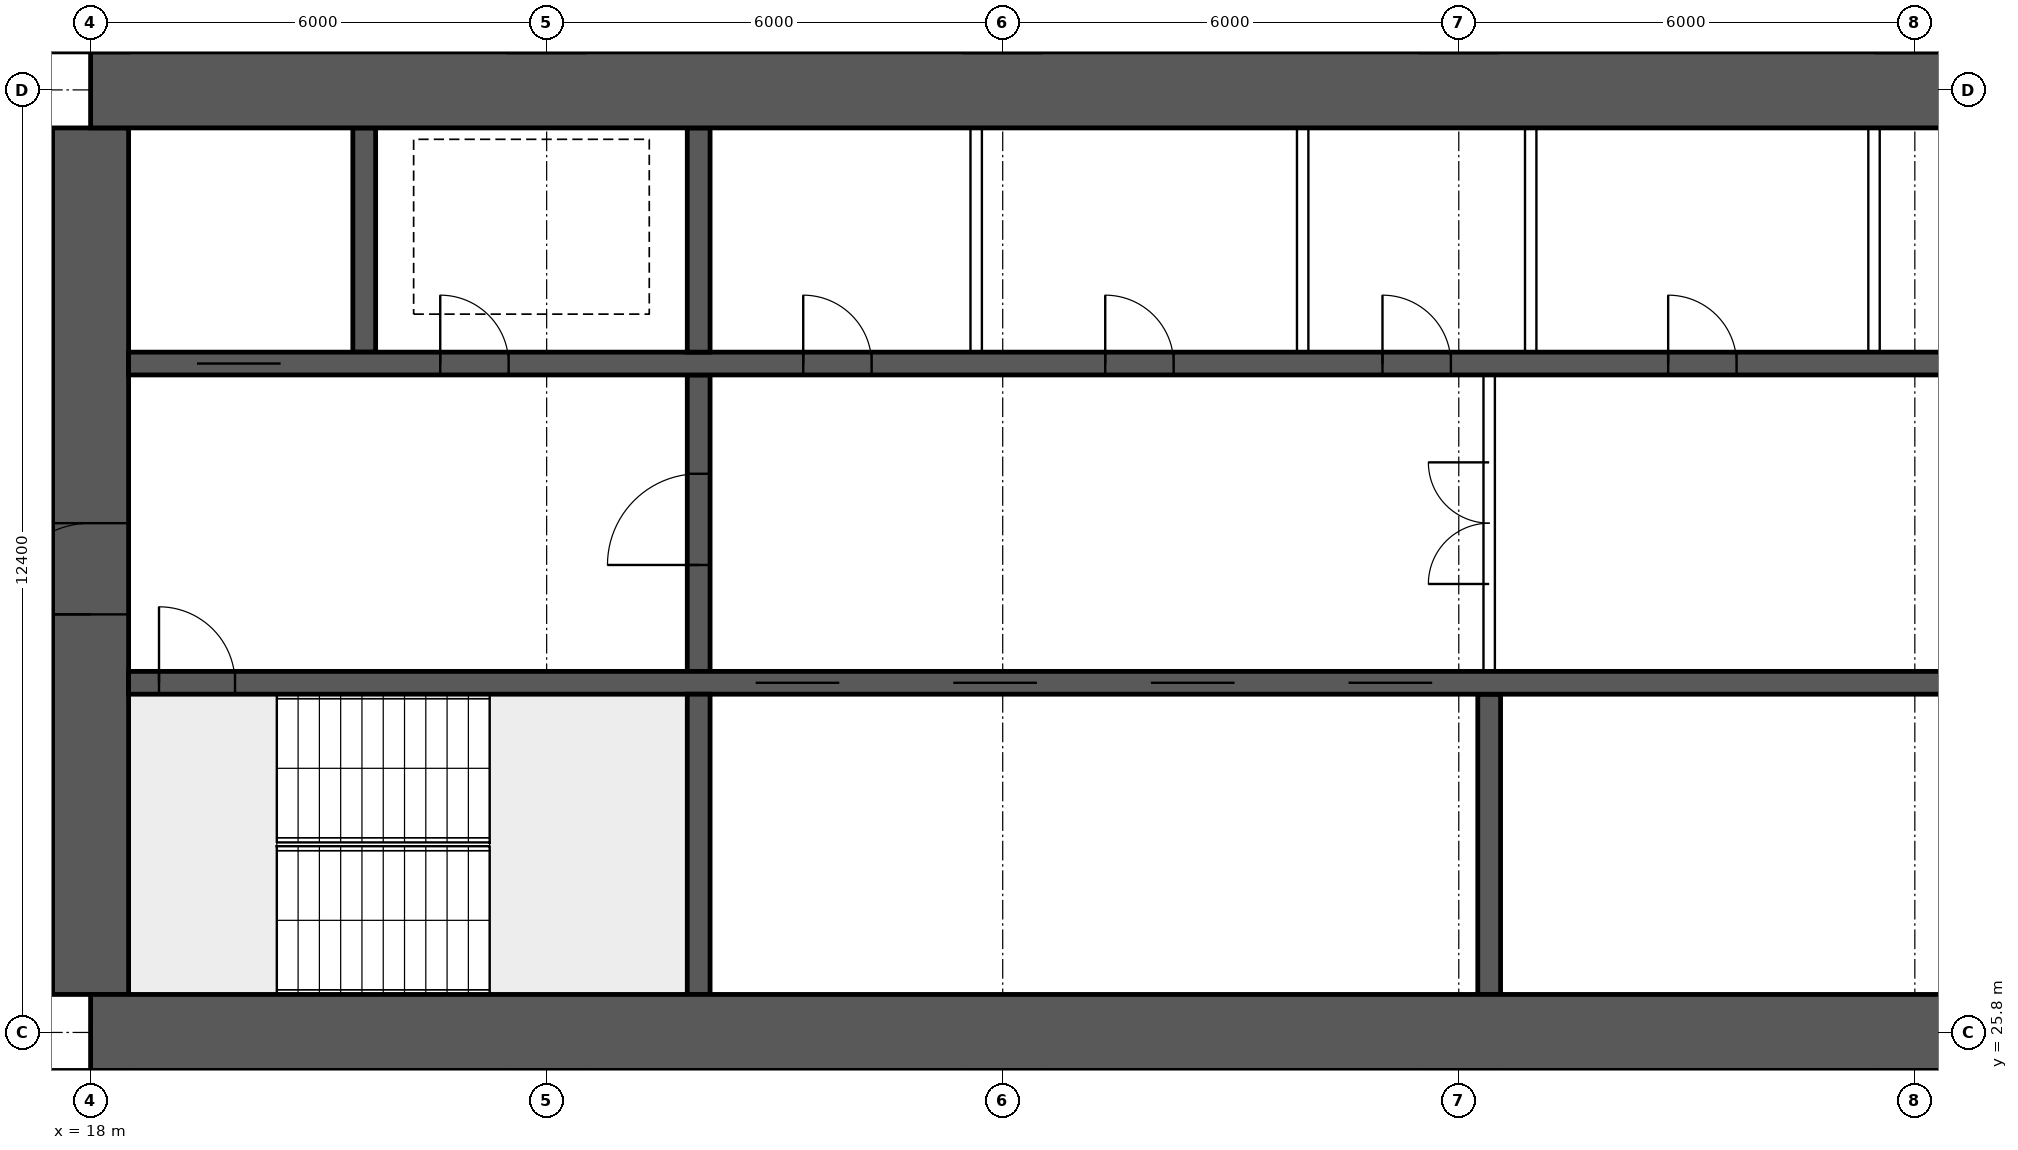
"""IFC4 building model, lengths in metres.
Left out: names, types, materials, properties, quantities, classifications, styles, units other than length and angle.
Written with IfcOpenShell. Run it as: python <this file> out.ifc"""

import sys

from ifc_helpers import new_model, si_unit, direction, frame, frame_2d, origin, place, context, subcontext, project, spatial, rectangle, extrude, element, fill, save


model = new_model("IFC4")
c1 = context("Model", 3, precision=1e-05, world=origin(), true_north=direction((0.0, 1.0)))
c2 = subcontext(c1, "Body", "Model", "MODEL_VIEW")
j1 = project(units=[si_unit("LENGTHUNIT", "METRE"), si_unit("PLANEANGLEUNIT", "RADIAN")], contexts=[c1])
p1 = place(None, origin())
s1 = spatial("IfcSite", under=j1, at=p1, CompositionType="ELEMENT")
p2 = place(p1, origin())
s2 = spatial("IfcBuilding", under=s1, at=p2, CompositionType="ELEMENT")
p3 = place(p2, frame((0.0, 0.0, 20.2)))
s3 = spatial("IfcBuildingStorey", under=s2, at=p3, CompositionType="ELEMENT", Elevation=20.2)
for number, where, z_axis, x_axis in (
    (1, (18.0, 25.8, 0.0), (0.0, 0.0, 1.0), (1.0, 0.0, 0.0)),
    (2, (18.0, 38.2, 0.0), (0.0, 0.0, 1.0), (1.0, 0.0, 0.0)),
):
    element("IfcWall", number, at=place(p3, frame(where, z_axis=z_axis, x_axis=x_axis)), inside=s3, PredefinedType="SHEAR", context=c2, shape_type="SweptSolid", body=[
        extrude(rectangle(XDim=48.0, YDim=1.0, at=frame_2d((24.0, 0.0))), origin(), (0.0, 0.0, 1.0), 3.75),
    ])
p4 = place(p3, frame((18.0, 26.3, 0.0), z_axis=(0.0, 0.0, 1.0), x_axis=(0.0, 1.0, 0.0)))
e3 = element("IfcWall", 3, at=p4, inside=s3, PredefinedType="SHEAR", context=c2, shape_type="SweptSolid", body=[
    extrude(rectangle(XDim=11.4, YDim=1.0, at=frame_2d((5.7, 0.0))), origin(), (0.0, 0.0, 1.0), 3.75),
])
p5 = place(p4, frame((5.0, 0.0, 0.0)))
e4 = element("IfcOpeningElement", 4, at=p5, cuts=e3, PredefinedType="OPENING", context=c2, shape_type="SweptSolid", body=[
    extrude(rectangle(XDim=1.2, YDim=2.1, at=frame_2d((0.6, 1.05))), frame((0.0, 0.51, 0.0), z_axis=(0.0, -1.0, 0.0), x_axis=(1.0, 0.0, 0.0)), (0.0, 0.0, 1.0), 1.02),
])
p6 = place(p3, frame((18.5, 30.4, 0.0), z_axis=(0.0, 0.0, 1.0), x_axis=(1.0, 0.0, 0.0)))
e5 = element("IfcWall", 5, at=p6, inside=s3, PredefinedType="SHEAR", context=c2, shape_type="SweptSolid", body=[
    extrude(rectangle(XDim=47.0, YDim=0.3, at=frame_2d((23.5, 0.0))), origin(), (0.0, 0.0, 1.0), 3.75),
])
p7 = place(p6, frame((0.4, 0.0, 0.0)))
e6 = element("IfcOpeningElement", 6, at=p7, cuts=e5, PredefinedType="OPENING", context=c2, shape_type="SweptSolid", body=[
    extrude(rectangle(XDim=1.0, YDim=2.1, at=frame_2d((0.5, 1.05))), frame((0.0, 0.16, 0.0), z_axis=(0.0, -1.0, 0.0), x_axis=(1.0, 0.0, 0.0)), (0.0, 0.0, 1.0), 0.32),
])
p8 = place(p6, frame((45.6, 0.0, 0.0)))
e7 = element("IfcOpeningElement", 7, at=p8, cuts=e5, PredefinedType="OPENING", context=c2, shape_type="SweptSolid", body=[
    extrude(rectangle(XDim=1.0, YDim=2.1, at=frame_2d((0.5, 1.05))), frame((0.0, 0.16, 0.0), z_axis=(0.0, -1.0, 0.0), x_axis=(1.0, 0.0, 0.0)), (0.0, 0.0, 1.0), 0.32),
])
p9 = place(p6, frame((8.25, 0.0, 0.0)))
e8 = element("IfcOpeningElement", 8, at=p9, cuts=e5, PredefinedType="OPENING", context=c2, shape_type="SweptSolid", body=[
    extrude(rectangle(XDim=1.1, YDim=2.1, at=frame_2d((0.55, 1.05))), frame((0.0, 0.16, 0.0), z_axis=(0.0, -1.0, 0.0), x_axis=(1.0, 0.0, 0.0)), (0.0, 0.0, 1.0), 0.32),
])
p10 = place(p6, frame((10.85, 0.0, 0.0)))
e9 = element("IfcOpeningElement", 9, at=p10, cuts=e5, PredefinedType="OPENING", context=c2, shape_type="SweptSolid", body=[
    extrude(rectangle(XDim=1.1, YDim=2.1, at=frame_2d((0.55, 1.05))), frame((0.0, 0.16, 0.0), z_axis=(0.0, -1.0, 0.0), x_axis=(1.0, 0.0, 0.0)), (0.0, 0.0, 1.0), 0.32),
])
p11 = place(p6, frame((13.45, 0.0, 0.0)))
e10 = element("IfcOpeningElement", 10, at=p11, cuts=e5, PredefinedType="OPENING", context=c2, shape_type="SweptSolid", body=[
    extrude(rectangle(XDim=1.1, YDim=2.1, at=frame_2d((0.55, 1.05))), frame((0.0, 0.16, 0.0), z_axis=(0.0, -1.0, 0.0), x_axis=(1.0, 0.0, 0.0)), (0.0, 0.0, 1.0), 0.32),
])
p12 = place(p6, frame((16.05, 0.0, 0.0)))
e11 = element("IfcOpeningElement", 11, at=p12, cuts=e5, PredefinedType="OPENING", context=c2, shape_type="SweptSolid", body=[
    extrude(rectangle(XDim=1.1, YDim=2.1, at=frame_2d((0.55, 1.05))), frame((0.0, 0.16, 0.0), z_axis=(0.0, -1.0, 0.0), x_axis=(1.0, 0.0, 0.0)), (0.0, 0.0, 1.0), 0.32),
])
p13 = place(p6, frame((30.117, 0.0, 0.0)))
e12 = element("IfcOpeningElement", 12, at=p13, cuts=e5, PredefinedType="OPENING", context=c2, shape_type="SweptSolid", body=[
    extrude(rectangle(XDim=1.1, YDim=2.1, at=frame_2d((0.55, 1.05))), frame((0.0, 0.16, 0.0), z_axis=(0.0, -1.0, 0.0), x_axis=(1.0, 0.0, 0.0)), (0.0, 0.0, 1.0), 0.32),
])
p14 = place(p6, frame((33.65, 0.0, 0.0)))
e13 = element("IfcOpeningElement", 13, at=p14, cuts=e5, PredefinedType="OPENING", context=c2, shape_type="SweptSolid", body=[
    extrude(rectangle(XDim=1.1, YDim=2.1, at=frame_2d((0.55, 1.05))), frame((0.0, 0.16, 0.0), z_axis=(0.0, -1.0, 0.0), x_axis=(1.0, 0.0, 0.0)), (0.0, 0.0, 1.0), 0.32),
])
p15 = place(p6, frame((37.183, 0.0, 0.0)))
e14 = element("IfcOpeningElement", 14, at=p15, cuts=e5, PredefinedType="OPENING", context=c2, shape_type="SweptSolid", body=[
    extrude(rectangle(XDim=1.1, YDim=2.1, at=frame_2d((0.55, 1.05))), frame((0.0, 0.16, 0.0), z_axis=(0.0, -1.0, 0.0), x_axis=(1.0, 0.0, 0.0)), (0.0, 0.0, 1.0), 0.32),
])
p16 = place(p3, frame((18.5, 34.6, 0.0), z_axis=(0.0, 0.0, 1.0), x_axis=(1.0, 0.0, 0.0)))
e15 = element("IfcWall", 15, at=p16, inside=s3, PredefinedType="SHEAR", context=c2, shape_type="SweptSolid", body=[
    extrude(rectangle(XDim=47.0, YDim=0.3, at=frame_2d((23.5, 0.0))), origin(), (0.0, 0.0, 1.0), 3.75),
])
p17 = place(p16, frame((0.9, 0.0, 0.0)))
e16 = element("IfcOpeningElement", 16, at=p17, cuts=e15, PredefinedType="OPENING", context=c2, shape_type="SweptSolid", body=[
    extrude(rectangle(XDim=1.1, YDim=2.1, at=frame_2d((0.55, 1.05))), frame((0.0, 0.16, 0.0), z_axis=(0.0, -1.0, 0.0), x_axis=(1.0, 0.0, 0.0)), (0.0, 0.0, 1.0), 0.32),
])
p18 = place(p16, frame((45.0, 0.0, 0.0)))
e17 = element("IfcOpeningElement", 17, at=p18, cuts=e15, PredefinedType="OPENING", context=c2, shape_type="SweptSolid", body=[
    extrude(rectangle(XDim=1.1, YDim=2.1, at=frame_2d((0.55, 1.05))), frame((0.0, 0.16, 0.0), z_axis=(0.0, -1.0, 0.0), x_axis=(1.0, 0.0, 0.0)), (0.0, 0.0, 1.0), 0.32),
])
p19 = place(p16, frame((4.1, 0.0, 0.0)))
e18 = element("IfcOpeningElement", 18, at=p19, cuts=e15, PredefinedType="OPENING", context=c2, shape_type="SweptSolid", body=[
    extrude(rectangle(XDim=0.9, YDim=2.1, at=frame_2d((0.45, 1.05))), frame((0.0, 0.16, 0.0), z_axis=(0.0, -1.0, 0.0), x_axis=(1.0, 0.0, 0.0)), (0.0, 0.0, 1.0), 0.32),
])
p20 = place(p16, frame((42.0, 0.0, 0.0)))
e19 = element("IfcOpeningElement", 19, at=p20, cuts=e15, PredefinedType="OPENING", context=c2, shape_type="SweptSolid", body=[
    extrude(rectangle(XDim=0.9, YDim=2.1, at=frame_2d((0.45, 1.05))), frame((0.0, 0.16, 0.0), z_axis=(0.0, -1.0, 0.0), x_axis=(1.0, 0.0, 0.0)), (0.0, 0.0, 1.0), 0.32),
])
p21 = place(p16, frame((8.875, 0.0, 0.0)))
e20 = element("IfcOpeningElement", 20, at=p21, cuts=e15, PredefinedType="OPENING", context=c2, shape_type="SweptSolid", body=[
    extrude(rectangle(XDim=0.9, YDim=2.1, at=frame_2d((0.45, 1.05))), frame((0.0, 0.16, 0.0), z_axis=(0.0, -1.0, 0.0), x_axis=(1.0, 0.0, 0.0)), (0.0, 0.0, 1.0), 0.32),
])
p22 = place(p16, frame((12.849, 0.0, 0.0)))
e21 = element("IfcOpeningElement", 21, at=p22, cuts=e15, PredefinedType="OPENING", context=c2, shape_type="SweptSolid", body=[
    extrude(rectangle(XDim=0.9, YDim=2.1, at=frame_2d((0.45, 1.05))), frame((0.0, 0.16, 0.0), z_axis=(0.0, -1.0, 0.0), x_axis=(1.0, 0.0, 0.0)), (0.0, 0.0, 1.0), 0.32),
])
p23 = place(p16, frame((16.496, 0.0, 0.0)))
e22 = element("IfcOpeningElement", 22, at=p23, cuts=e15, PredefinedType="OPENING", context=c2, shape_type="SweptSolid", body=[
    extrude(rectangle(XDim=0.9, YDim=2.1, at=frame_2d((0.45, 1.05))), frame((0.0, 0.16, 0.0), z_axis=(0.0, -1.0, 0.0), x_axis=(1.0, 0.0, 0.0)), (0.0, 0.0, 1.0), 0.32),
])
p24 = place(p16, frame((20.255, 0.0, 0.0)))
e23 = element("IfcOpeningElement", 23, at=p24, cuts=e15, PredefinedType="OPENING", context=c2, shape_type="SweptSolid", body=[
    extrude(rectangle(XDim=0.9, YDim=2.1, at=frame_2d((0.45, 1.05))), frame((0.0, 0.16, 0.0), z_axis=(0.0, -1.0, 0.0), x_axis=(1.0, 0.0, 0.0)), (0.0, 0.0, 1.0), 0.32),
])
p25 = place(p16, frame((24.661, 0.0, 0.0)))
e24 = element("IfcOpeningElement", 24, at=p25, cuts=e15, PredefinedType="OPENING", context=c2, shape_type="SweptSolid", body=[
    extrude(rectangle(XDim=0.9, YDim=2.1, at=frame_2d((0.45, 1.05))), frame((0.0, 0.16, 0.0), z_axis=(0.0, -1.0, 0.0), x_axis=(1.0, 0.0, 0.0)), (0.0, 0.0, 1.0), 0.32),
])
p26 = place(p16, frame((27.458, 0.0, 0.0)))
e25 = element("IfcOpeningElement", 25, at=p26, cuts=e15, PredefinedType="OPENING", context=c2, shape_type="SweptSolid", body=[
    extrude(rectangle(XDim=0.9, YDim=2.1, at=frame_2d((0.45, 1.05))), frame((0.0, 0.16, 0.0), z_axis=(0.0, -1.0, 0.0), x_axis=(1.0, 0.0, 0.0)), (0.0, 0.0, 1.0), 0.32),
])
p27 = place(p16, frame((29.831, 0.0, 0.0)))
e26 = element("IfcOpeningElement", 26, at=p27, cuts=e15, PredefinedType="OPENING", context=c2, shape_type="SweptSolid", body=[
    extrude(rectangle(XDim=0.9, YDim=2.1, at=frame_2d((0.45, 1.05))), frame((0.0, 0.16, 0.0), z_axis=(0.0, -1.0, 0.0), x_axis=(1.0, 0.0, 0.0)), (0.0, 0.0, 1.0), 0.32),
])
p28 = place(p16, frame((33.68, 0.0, 0.0)))
e27 = element("IfcOpeningElement", 27, at=p28, cuts=e15, PredefinedType="OPENING", context=c2, shape_type="SweptSolid", body=[
    extrude(rectangle(XDim=0.9, YDim=2.1, at=frame_2d((0.45, 1.05))), frame((0.0, 0.16, 0.0), z_axis=(0.0, -1.0, 0.0), x_axis=(1.0, 0.0, 0.0)), (0.0, 0.0, 1.0), 0.32),
])
p29 = place(p16, frame((37.429, 0.0, 0.0)))
e28 = element("IfcOpeningElement", 28, at=p29, cuts=e15, PredefinedType="OPENING", context=c2, shape_type="SweptSolid", body=[
    extrude(rectangle(XDim=0.9, YDim=2.1, at=frame_2d((0.45, 1.05))), frame((0.0, 0.16, 0.0), z_axis=(0.0, -1.0, 0.0), x_axis=(1.0, 0.0, 0.0)), (0.0, 0.0, 1.0), 0.32),
])
p30 = place(p3, frame((26.0, 26.3, 0.0), z_axis=(0.0, 0.0, 1.0), x_axis=(0.0, 1.0, 0.0)))
e29 = element("IfcWall", 29, at=p30, inside=s3, PredefinedType="SHEAR", context=c2, shape_type="SweptSolid", body=[
    extrude(rectangle(XDim=3.95, YDim=0.3, at=frame_2d((1.975, 0.0))), origin(), (0.0, 0.0, 1.0), 3.75),
])
p31 = place(p3, frame((26.0, 30.55, 0.0), z_axis=(0.0, 0.0, 1.0), x_axis=(0.0, 1.0, 0.0)))
e30 = element("IfcWall", 30, at=p31, inside=s3, PredefinedType="SHEAR", context=c2, shape_type="SweptSolid", body=[
    extrude(rectangle(XDim=3.9, YDim=0.3, at=frame_2d((1.95, 0.0))), origin(), (0.0, 0.0, 1.0), 3.75),
])
p32 = place(p31, frame((1.4, 0.0, 0.0)))
e31 = element("IfcOpeningElement", 31, at=p32, cuts=e30, PredefinedType="OPENING", context=c2, shape_type="SweptSolid", body=[
    extrude(rectangle(XDim=1.2, YDim=2.1, at=frame_2d((0.6, 1.05))), frame((0.0, 0.16, 0.0), z_axis=(0.0, -1.0, 0.0), x_axis=(1.0, 0.0, 0.0)), (0.0, 0.0, 1.0), 0.32),
])
for number, where, z_axis, x_axis in (
    (32, (21.6, 34.75, 0.0), (0.0, 0.0, 1.0), (0.0, 1.0, 0.0)),
    (33, (26.0, 34.75, 0.0), (0.0, 0.0, 1.0), (0.0, 1.0, 0.0)),
):
    element("IfcWall", number, at=place(p3, frame(where, z_axis=z_axis, x_axis=x_axis)), inside=s3, PredefinedType="SHEAR", context=c2, shape_type="SweptSolid", body=[
        extrude(rectangle(XDim=2.95, YDim=0.3, at=frame_2d((1.475, 0.0))), origin(), (0.0, 0.0, 1.0), 3.75),
    ])
p33 = place(p3, frame((36.4, 26.3, 0.0), z_axis=(0.0, 0.0, 1.0), x_axis=(0.0, 1.0, 0.0)))
e34 = element("IfcWall", 34, at=p33, inside=s3, PredefinedType="SHEAR", context=c2, shape_type="SweptSolid", body=[
    extrude(rectangle(XDim=3.95, YDim=0.3, at=frame_2d((1.975, 0.0))), origin(), (0.0, 0.0, 1.0), 3.75),
])
p34 = place(p3, frame((36.4, 30.55, 0.0), z_axis=(0.0, 0.0, 1.0), x_axis=(0.0, 1.0, 0.0)))
e35 = element("IfcWall", 35, at=p34, inside=s3, PredefinedType="SOLIDWALL", context=c2, shape_type="SweptSolid", body=[
    extrude(rectangle(XDim=3.9, YDim=0.15, at=frame_2d((1.95, 0.0))), origin(), (0.0, 0.0, 1.0), 3.3),
])
p35 = place(p34, frame((1.15, 0.0, 0.0)))
e36 = element("IfcOpeningElement", 36, at=p35, cuts=e35, PredefinedType="OPENING", context=c2, shape_type="SweptSolid", body=[
    extrude(rectangle(XDim=1.6, YDim=2.1, at=frame_2d((0.8, 1.05))), frame((0.0, 0.085, 0.0), z_axis=(0.0, -1.0, 0.0), x_axis=(1.0, 0.0, 0.0)), (0.0, 0.0, 1.0), 0.17),
])
for number, where, z_axis, x_axis in (
    (37, (29.651, 34.75, 0.0), (0.0, 0.0, 1.0), (0.0, 1.0, 0.0)),
    (38, (33.946, 34.75, 0.0), (0.0, 0.0, 1.0), (0.0, 1.0, 0.0)),
    (39, (36.946, 34.75, 0.0), (0.0, 0.0, 1.0), (0.0, 1.0, 0.0)),
    (40, (41.463, 34.75, 0.0), (0.0, 0.0, 1.0), (0.0, 1.0, 0.0)),
):
    element("IfcWall", number, at=place(p3, frame(where, z_axis=z_axis, x_axis=x_axis)), inside=s3, PredefinedType="SOLIDWALL", context=c2, shape_type="SweptSolid", body=[
        extrude(rectangle(XDim=2.95, YDim=0.15, at=frame_2d((1.475, 0.0))), origin(), (0.0, 0.0, 1.0), 3.3),
    ])
for number, where, z_axis, x_axis in (
    (41, (21.725, 14.9, 0.0), (0.0, 0.0, 1.0), (0.0, 1.0, 0.0)),
    (42, (33.5, 14.9, 0.0), (0.0, 0.0, 1.0), (0.0, 1.0, 0.0)),
    (43, (38.79, 14.9, 0.0), (0.0, 0.0, 1.0), (0.0, 1.0, 0.0)),
):
    element("IfcWall", number, at=place(p3, frame(where, z_axis=z_axis, x_axis=x_axis)), inside=s3, PredefinedType="PARTITIONING", context=c2, shape_type="SweptSolid", body=[
        extrude(rectangle(XDim=10.4, YDim=0.15, at=frame_2d((5.2, 0.0))), origin(), (0.0, 0.0, 1.0), 3.3),
    ])
p36 = place(p35, origin())
e44 = element("IfcDoor", 44, at=p36, inside=s3, OperationType="DOUBLE_DOOR_SINGLE_SWING", PredefinedType="DOOR", context=c2, shape_type="SweptSolid", body=[
    extrude(rectangle(XDim=1.6, YDim=2.1, at=frame_2d((0.8, 1.05))), frame((0.0, 0.025, 0.0), z_axis=(0.0, -1.0, 0.0), x_axis=(1.0, 0.0, 0.0)), (0.0, 0.0, 1.0), 0.05),
])
fill(e36, e44)
p37 = place(p5, origin())
e45 = element("IfcDoor", 45, at=p37, inside=s3, OperationType="SINGLE_SWING_LEFT", PredefinedType="DOOR", context=c2, shape_type="SweptSolid", body=[
    extrude(rectangle(XDim=1.2, YDim=2.1, at=frame_2d((0.6, 1.05))), frame((0.0, 0.025, 0.0), z_axis=(0.0, -1.0, 0.0), x_axis=(1.0, 0.0, 0.0)), (0.0, 0.0, 1.0), 0.05),
])
fill(e4, e45)
p38 = place(p7, origin())
e46 = element("IfcDoor", 46, at=p38, inside=s3, OperationType="SINGLE_SWING_LEFT", PredefinedType="DOOR", context=c2, shape_type="SweptSolid", body=[
    extrude(rectangle(XDim=1.0, YDim=2.1, at=frame_2d((0.5, 1.05))), frame((0.0, 0.025, 0.0), z_axis=(0.0, -1.0, 0.0), x_axis=(1.0, 0.0, 0.0)), (0.0, 0.0, 1.0), 0.05),
])
fill(e6, e46)
p39 = place(p17, origin())
e47 = element("IfcDoor", 47, at=p39, inside=s3, OperationType="DOUBLE_DOOR_SLIDING", PredefinedType="DOOR", context=c2, shape_type="SweptSolid", body=[
    extrude(rectangle(XDim=1.1, YDim=2.1, at=frame_2d((0.55, 1.05))), frame((0.0, 0.025, 0.0), z_axis=(0.0, -1.0, 0.0), x_axis=(1.0, 0.0, 0.0)), (0.0, 0.0, 1.0), 0.05),
])
fill(e16, e47)
p40 = place(p19, origin())
e48 = element("IfcDoor", 48, at=p40, inside=s3, OperationType="SINGLE_SWING_LEFT", PredefinedType="DOOR", context=c2, shape_type="SweptSolid", body=[
    extrude(rectangle(XDim=0.9, YDim=2.1, at=frame_2d((0.45, 1.05))), frame((0.0, 0.025, 0.0), z_axis=(0.0, -1.0, 0.0), x_axis=(1.0, 0.0, 0.0)), (0.0, 0.0, 1.0), 0.05),
])
fill(e18, e48)
p41 = place(p32, origin())
e49 = element("IfcDoor", 49, at=p41, inside=s3, OperationType="SINGLE_SWING_LEFT", PredefinedType="DOOR", context=c2, shape_type="SweptSolid", body=[
    extrude(rectangle(XDim=1.2, YDim=2.1, at=frame_2d((0.6, 1.05))), frame((0.0, 0.025, 0.0), z_axis=(0.0, -1.0, 0.0), x_axis=(1.0, 0.0, 0.0)), (0.0, 0.0, 1.0), 0.05),
])
fill(e31, e49)
p42 = place(p21, origin())
e50 = element("IfcDoor", 50, at=p42, inside=s3, OperationType="SINGLE_SWING_LEFT", PredefinedType="DOOR", context=c2, shape_type="SweptSolid", body=[
    extrude(rectangle(XDim=0.9, YDim=2.1, at=frame_2d((0.45, 1.05))), frame((0.0, 0.025, 0.0), z_axis=(0.0, -1.0, 0.0), x_axis=(1.0, 0.0, 0.0)), (0.0, 0.0, 1.0), 0.05),
])
fill(e20, e50)
p43 = place(p22, origin())
e51 = element("IfcDoor", 51, at=p43, inside=s3, OperationType="SINGLE_SWING_LEFT", PredefinedType="DOOR", context=c2, shape_type="SweptSolid", body=[
    extrude(rectangle(XDim=0.9, YDim=2.1, at=frame_2d((0.45, 1.05))), frame((0.0, 0.025, 0.0), z_axis=(0.0, -1.0, 0.0), x_axis=(1.0, 0.0, 0.0)), (0.0, 0.0, 1.0), 0.05),
])
fill(e21, e51)
p44 = place(p23, origin())
e52 = element("IfcDoor", 52, at=p44, inside=s3, OperationType="SINGLE_SWING_LEFT", PredefinedType="DOOR", context=c2, shape_type="SweptSolid", body=[
    extrude(rectangle(XDim=0.9, YDim=2.1, at=frame_2d((0.45, 1.05))), frame((0.0, 0.025, 0.0), z_axis=(0.0, -1.0, 0.0), x_axis=(1.0, 0.0, 0.0)), (0.0, 0.0, 1.0), 0.05),
])
fill(e22, e52)
p45 = place(p24, origin())
e53 = element("IfcDoor", 53, at=p45, inside=s3, OperationType="SINGLE_SWING_LEFT", PredefinedType="DOOR", context=c2, shape_type="SweptSolid", body=[
    extrude(rectangle(XDim=0.9, YDim=2.1, at=frame_2d((0.45, 1.05))), frame((0.0, 0.025, 0.0), z_axis=(0.0, -1.0, 0.0), x_axis=(1.0, 0.0, 0.0)), (0.0, 0.0, 1.0), 0.05),
])
fill(e23, e53)
p46 = place(p9, origin())
e54 = element("IfcDoor", 54, at=p46, inside=s3, OperationType="DOUBLE_DOOR_SLIDING", PredefinedType="DOOR", context=c2, shape_type="SweptSolid", body=[
    extrude(rectangle(XDim=1.1, YDim=2.1, at=frame_2d((0.55, 1.05))), frame((0.0, 0.025, 0.0), z_axis=(0.0, -1.0, 0.0), x_axis=(1.0, 0.0, 0.0)), (0.0, 0.0, 1.0), 0.05),
])
fill(e8, e54)
p47 = place(p10, origin())
e55 = element("IfcDoor", 55, at=p47, inside=s3, OperationType="DOUBLE_DOOR_SLIDING", PredefinedType="DOOR", context=c2, shape_type="SweptSolid", body=[
    extrude(rectangle(XDim=1.1, YDim=2.1, at=frame_2d((0.55, 1.05))), frame((0.0, 0.025, 0.0), z_axis=(0.0, -1.0, 0.0), x_axis=(1.0, 0.0, 0.0)), (0.0, 0.0, 1.0), 0.05),
])
fill(e9, e55)
p48 = place(p11, origin())
e56 = element("IfcDoor", 56, at=p48, inside=s3, OperationType="DOUBLE_DOOR_SLIDING", PredefinedType="DOOR", context=c2, shape_type="SweptSolid", body=[
    extrude(rectangle(XDim=1.1, YDim=2.1, at=frame_2d((0.55, 1.05))), frame((0.0, 0.025, 0.0), z_axis=(0.0, -1.0, 0.0), x_axis=(1.0, 0.0, 0.0)), (0.0, 0.0, 1.0), 0.05),
])
fill(e10, e56)
p49 = place(p12, origin())
e57 = element("IfcDoor", 57, at=p49, inside=s3, OperationType="DOUBLE_DOOR_SLIDING", PredefinedType="DOOR", context=c2, shape_type="SweptSolid", body=[
    extrude(rectangle(XDim=1.1, YDim=2.1, at=frame_2d((0.55, 1.05))), frame((0.0, 0.025, 0.0), z_axis=(0.0, -1.0, 0.0), x_axis=(1.0, 0.0, 0.0)), (0.0, 0.0, 1.0), 0.05),
])
fill(e11, e57)
save(model, sys.argv[1])
